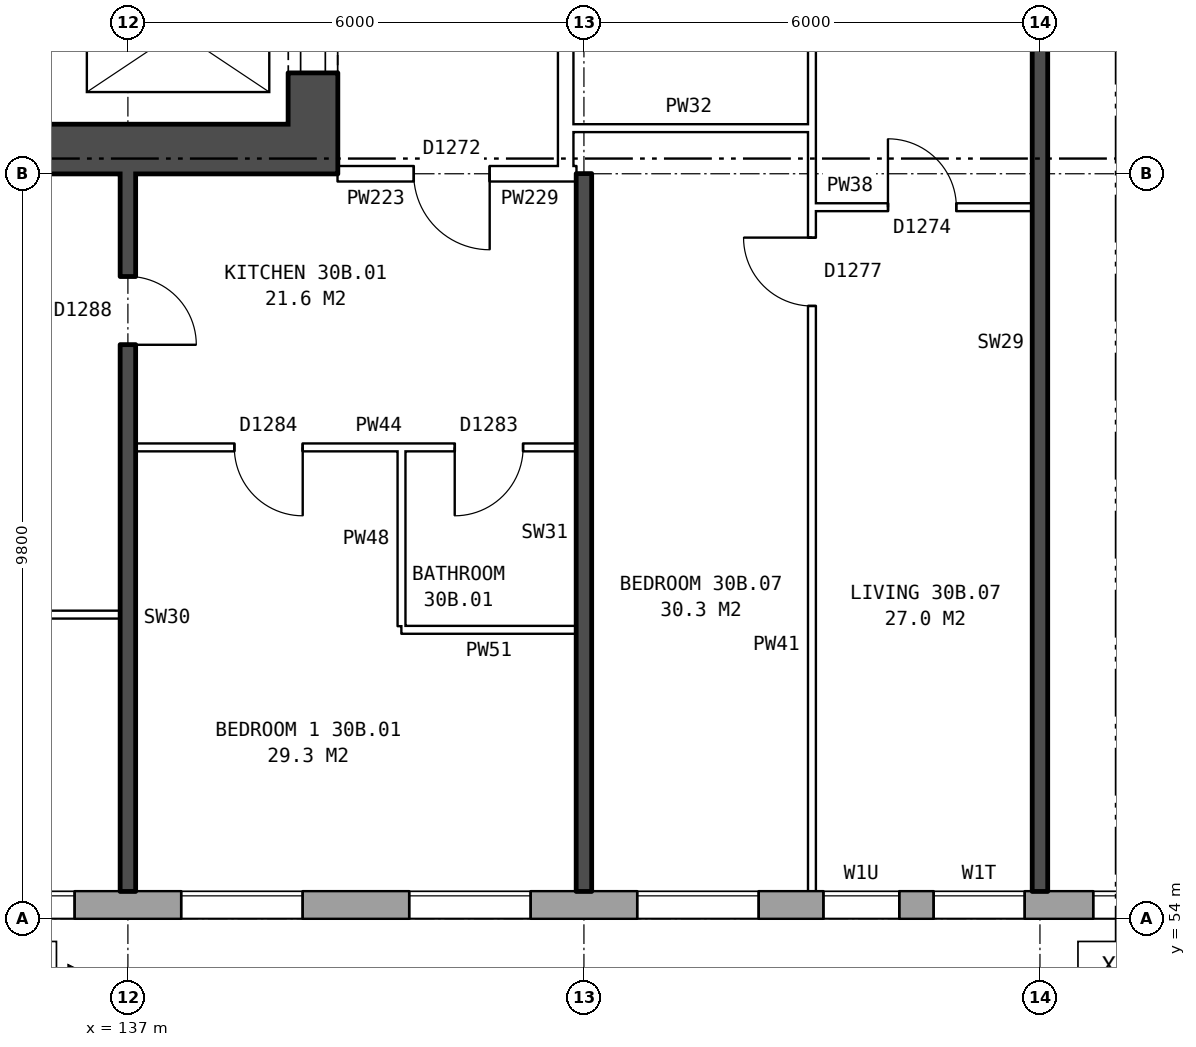
"""IFC4 building model, lengths in metres.
Left out: names, types, materials, properties, quantities, classifications, styles, units other than length and angle.
Written with IfcOpenShell. Run it as: python <this file> out.ifc"""

import sys

from ifc_helpers import new_model, si_unit, direction, frame, frame_2d, origin, place, context, subcontext, project, spatial, rectangle, extrude, element, fill, save


model = new_model("IFC4")
c1 = context("Model", 3, precision=1e-05, world=origin(), true_north=direction((0.0, 1.0)))
c2 = subcontext(c1, "Body", "Model", "MODEL_VIEW")
j1 = project(units=[si_unit("LENGTHUNIT", "METRE"), si_unit("PLANEANGLEUNIT", "RADIAN")], contexts=[c1])
p1 = place(None, origin())
s1 = spatial("IfcSite", under=j1, at=p1, CompositionType="ELEMENT")
p2 = place(p1, origin())
s2 = spatial("IfcBuilding", under=s1, at=p2, CompositionType="ELEMENT")
p3 = place(p2, frame((0.0, 0.0, 108.8)))
s3 = spatial("IfcBuildingStorey", under=s2, at=p3, CompositionType="ELEMENT", Elevation=108.8)
p4 = place(p3, frame((134.075, 54.18, 0.0), z_axis=(0.0, 0.0, 1.0), x_axis=(1.0, 0.0, 0.0)))
e1 = element("IfcWall", 1, at=p4, inside=s3, PredefinedType="STANDARD", context=c2, shape_type="SweptSolid", body=[
    extrude(rectangle(XDim=36.851, YDim=0.36, at=frame_2d((18.425, 0.0))), origin(), (0.0, 0.0, 1.0), 2.85),
])
p5 = place(p4, frame((0.625, 0.0, 0.8)))
e2 = element("IfcOpeningElement", 2, at=p5, cuts=e1, PredefinedType="OPENING", context=c2, shape_type="SweptSolid", body=[
    extrude(rectangle(XDim=1.6, YDim=1.8, at=frame_2d((0.8, 0.9))), frame((0.0, 0.19, 0.0), z_axis=(0.0, -1.0, 0.0), x_axis=(1.0, 0.0, 0.0)), (0.0, 0.0, 1.0), 0.38),
])
p6 = place(p4, frame((3.625, 0.0, 0.8)))
e3 = element("IfcOpeningElement", 3, at=p6, cuts=e1, PredefinedType="OPENING", context=c2, shape_type="SweptSolid", body=[
    extrude(rectangle(XDim=1.6, YDim=1.8, at=frame_2d((0.8, 0.9))), frame((0.0, 0.19, 0.0), z_axis=(0.0, -1.0, 0.0), x_axis=(1.0, 0.0, 0.0)), (0.0, 0.0, 1.0), 0.38),
])
p7 = place(p4, frame((6.625, 0.0, 0.8)))
e4 = element("IfcOpeningElement", 4, at=p7, cuts=e1, PredefinedType="OPENING", context=c2, shape_type="SweptSolid", body=[
    extrude(rectangle(XDim=1.6, YDim=1.8, at=frame_2d((0.8, 0.9))), frame((0.0, 0.19, 0.0), z_axis=(0.0, -1.0, 0.0), x_axis=(1.0, 0.0, 0.0)), (0.0, 0.0, 1.0), 0.38),
])
p8 = place(p4, frame((9.625, 0.0, 0.8)))
e5 = element("IfcOpeningElement", 5, at=p8, cuts=e1, PredefinedType="OPENING", context=c2, shape_type="SweptSolid", body=[
    extrude(rectangle(XDim=1.6, YDim=1.8, at=frame_2d((0.8, 0.9))), frame((0.0, 0.19, 0.0), z_axis=(0.0, -1.0, 0.0), x_axis=(1.0, 0.0, 0.0)), (0.0, 0.0, 1.0), 0.38),
])
p9 = place(p4, frame((12.075, 0.0, 1.65)))
e6 = element("IfcOpeningElement", 6, at=p9, cuts=e1, PredefinedType="OPENING", context=c2, shape_type="SweptSolid", body=[
    extrude(rectangle(XDim=1.0, YDim=0.9, at=frame_2d((0.5, 0.45))), frame((0.0, 0.19, 0.0), z_axis=(0.0, -1.0, 0.0), x_axis=(1.0, 0.0, 0.0)), (0.0, 0.0, 1.0), 0.38),
])
p10 = place(p4, frame((15.625, 0.0, 0.8)))
e7 = element("IfcOpeningElement", 7, at=p10, cuts=e1, PredefinedType="OPENING", context=c2, shape_type="SweptSolid", body=[
    extrude(rectangle(XDim=1.6, YDim=1.8, at=frame_2d((0.8, 0.9))), frame((0.0, 0.19, 0.0), z_axis=(0.0, -1.0, 0.0), x_axis=(1.0, 0.0, 0.0)), (0.0, 0.0, 1.0), 0.38),
])
p11 = place(p4, frame((18.625, 0.0, 0.8)))
e8 = element("IfcOpeningElement", 8, at=p11, cuts=e1, PredefinedType="OPENING", context=c2, shape_type="SweptSolid", body=[
    extrude(rectangle(XDim=1.6, YDim=1.8, at=frame_2d((0.8, 0.9))), frame((0.0, 0.19, 0.0), z_axis=(0.0, -1.0, 0.0), x_axis=(1.0, 0.0, 0.0)), (0.0, 0.0, 1.0), 0.38),
])
p12 = place(p4, frame((21.125, 0.0, 0.8)))
e9 = element("IfcOpeningElement", 9, at=p12, cuts=e1, PredefinedType="OPENING", context=c2, shape_type="SweptSolid", body=[
    extrude(rectangle(XDim=1.4, YDim=0.9, at=frame_2d((0.7, 0.45))), frame((0.0, 0.19, 0.0), z_axis=(0.0, -1.0, 0.0), x_axis=(1.0, 0.0, 0.0)), (0.0, 0.0, 1.0), 0.38),
])
p13 = place(p4, frame((24.625, 0.0, 0.8)))
e10 = element("IfcOpeningElement", 10, at=p13, cuts=e1, PredefinedType="OPENING", context=c2, shape_type="SweptSolid", body=[
    extrude(rectangle(XDim=1.6, YDim=1.8, at=frame_2d((0.8, 0.9))), frame((0.0, 0.19, 0.0), z_axis=(0.0, -1.0, 0.0), x_axis=(1.0, 0.0, 0.0)), (0.0, 0.0, 1.0), 0.38),
])
p14 = place(p4, frame((27.625, 0.0, 0.8)))
e11 = element("IfcOpeningElement", 11, at=p14, cuts=e1, PredefinedType="OPENING", context=c2, shape_type="SweptSolid", body=[
    extrude(rectangle(XDim=1.6, YDim=1.8, at=frame_2d((0.8, 0.9))), frame((0.0, 0.19, 0.0), z_axis=(0.0, -1.0, 0.0), x_axis=(1.0, 0.0, 0.0)), (0.0, 0.0, 1.0), 0.38),
])
p15 = place(p4, frame((30.625, 0.0, 0.8)))
e12 = element("IfcOpeningElement", 12, at=p15, cuts=e1, PredefinedType="OPENING", context=c2, shape_type="SweptSolid", body=[
    extrude(rectangle(XDim=1.6, YDim=1.8, at=frame_2d((0.8, 0.9))), frame((0.0, 0.19, 0.0), z_axis=(0.0, -1.0, 0.0), x_axis=(1.0, 0.0, 0.0)), (0.0, 0.0, 1.0), 0.38),
])
p16 = place(p4, frame((33.625, 0.0, 0.8)))
e13 = element("IfcOpeningElement", 13, at=p16, cuts=e1, PredefinedType="OPENING", context=c2, shape_type="SweptSolid", body=[
    extrude(rectangle(XDim=1.6, YDim=1.8, at=frame_2d((0.8, 0.9))), frame((0.0, 0.19, 0.0), z_axis=(0.0, -1.0, 0.0), x_axis=(1.0, 0.0, 0.0)), (0.0, 0.0, 1.0), 0.38),
])
p17 = place(p4, frame((13.525, 0.0, 0.15)))
e14 = element("IfcOpeningElement", 14, at=p17, cuts=e1, PredefinedType="OPENING", context=c2, shape_type="SweptSolid", body=[
    extrude(rectangle(XDim=1.2, YDim=0.9, at=frame_2d((0.6, 0.45))), frame((0.0, 0.19, 0.0), z_axis=(0.0, -1.0, 0.0), x_axis=(1.0, 0.0, 0.0)), (0.0, 0.0, 1.0), 0.38),
])
p18 = place(p4, frame((23.725, 0.0, 1.7)))
e15 = element("IfcOpeningElement", 15, at=p18, cuts=e1, PredefinedType="OPENING", context=c2, shape_type="SweptSolid", body=[
    extrude(rectangle(XDim=0.6, YDim=0.9, at=frame_2d((0.3, 0.45))), frame((0.0, 0.19, 0.0), z_axis=(0.0, -1.0, 0.0), x_axis=(1.0, 0.0, 0.0)), (0.0, 0.0, 1.0), 0.38),
])
p19 = place(p3, frame((139.435, 64.45, 0.0), z_axis=(0.0, 0.0, 1.0), x_axis=(0.0, 1.0, 0.0)))
e16 = element("IfcWall", 16, at=p19, inside=s3, PredefinedType="SHEAR", context=c2, shape_type="SweptSolid", body=[
    extrude(rectangle(XDim=11.1, YDim=0.65, at=frame_2d((5.55, 0.0))), origin(), (0.0, 0.0, 1.0), 2.85),
])
p20 = place(p19, frame((0.675, 0.0, 0.0)))
e17 = element("IfcOpeningElement", 17, at=p20, cuts=e16, PredefinedType="OPENING", context=c2, shape_type="SweptSolid", body=[
    extrude(rectangle(XDim=1.1, YDim=2.1, at=frame_2d((0.55, 1.05))), frame((0.0, 0.335, 0.0), z_axis=(0.0, -1.0, 0.0), x_axis=(1.0, 0.0, 0.0)), (0.0, 0.0, 1.0), 0.67),
])
p21 = place(p19, frame((9.25, 0.0, 0.0)))
e18 = element("IfcOpeningElement", 18, at=p21, cuts=e16, PredefinedType="OPENING", context=c2, shape_type="SweptSolid", body=[
    extrude(rectangle(XDim=1.1, YDim=2.1, at=frame_2d((0.55, 1.05))), frame((0.0, 0.335, 0.0), z_axis=(0.0, -1.0, 0.0), x_axis=(1.0, 0.0, 0.0)), (0.0, 0.0, 1.0), 0.67),
])
p22 = place(p19, frame((7.475, 0.0, 0.0)))
e19 = element("IfcOpeningElement", 19, at=p22, cuts=e16, PredefinedType="OPENING", context=c2, shape_type="SweptSolid", body=[
    extrude(rectangle(XDim=0.85, YDim=2.1, at=frame_2d((0.425, 1.05))), frame((0.0, 0.335, 0.0), z_axis=(0.0, -1.0, 0.0), x_axis=(1.0, 0.0, 0.0)), (0.0, 0.0, 1.0), 0.67),
])
p23 = place(p3, frame((139.76, 64.125, 0.0), z_axis=(0.0, 0.0, 1.0), x_axis=(-1.0, 0.0, 0.0)))
e20 = element("IfcWall", 20, at=p23, inside=s3, PredefinedType="SHEAR", context=c2, shape_type="SweptSolid", body=[
    extrude(rectangle(XDim=8.4, YDim=0.65, at=frame_2d((4.2, 0.0))), origin(), (0.0, 0.0, 1.0), 2.85),
])
p24 = place(p3, frame((142.76, 63.9, 0.0), z_axis=(0.0, 0.0, 1.0), x_axis=(0.0, 1.0, 0.0)))
e21 = element("IfcWall", 21, at=p24, inside=s3, PredefinedType="PARTITIONING", context=c2, shape_type="SweptSolid", body=[
    extrude(rectangle(XDim=12.2, YDim=0.2, at=frame_2d((6.1, 0.0))), origin(), (0.0, 0.0, 1.0), 2.85),
])
p25 = place(p24, frame((5.1, 0.0, 0.0)))
e22 = element("IfcOpeningElement", 22, at=p25, cuts=e21, PredefinedType="OPENING", context=c2, shape_type="SweptSolid", body=[
    extrude(rectangle(XDim=2.0, YDim=2.1, at=frame_2d((1.0, 1.05))), frame((0.0, 0.11, 0.0), z_axis=(0.0, -1.0, 0.0), x_axis=(1.0, 0.0, 0.0)), (0.0, 0.0, 1.0), 0.22),
])
p26 = place(p3, frame((140.6, 57.8, 0.0), z_axis=(0.0, 0.0, 1.0), x_axis=(1.0, 0.0, 0.0)))
e23 = element("IfcWall", 23, at=p26, inside=s3, PredefinedType="PARTITIONING", context=c2, shape_type="SweptSolid", body=[
    extrude(rectangle(XDim=2.3, YDim=0.1, at=frame_2d((1.15, 0.0))), origin(), (0.0, 0.0, 1.0), 2.85),
])
p27 = place(p3, frame((131.36, 58.0, 0.0), z_axis=(0.0, 0.0, 1.0), x_axis=(1.0, 0.0, 0.0)))
e24 = element("IfcWall", 24, at=p27, inside=s3, PredefinedType="PARTITIONING", context=c2, shape_type="SweptSolid", body=[
    extrude(rectangle(XDim=5.54, YDim=0.1, at=frame_2d((2.77, 0.0))), origin(), (0.0, 0.0, 1.0), 2.85),
])
p28 = place(p27, frame((2.32, 0.0, 0.0)))
e25 = element("IfcOpeningElement", 25, at=p28, cuts=e24, PredefinedType="OPENING", context=c2, shape_type="SweptSolid", body=[
    extrude(rectangle(XDim=0.9, YDim=2.1, at=frame_2d((0.45, 1.05))), frame((0.0, 0.06, 0.0), z_axis=(0.0, -1.0, 0.0), x_axis=(1.0, 0.0, 0.0)), (0.0, 0.0, 1.0), 0.12),
])
p29 = place(p3, frame((137.1, 60.2, 0.0), z_axis=(0.0, 0.0, 1.0), x_axis=(1.0, 0.0, 0.0)))
e26 = element("IfcWall", 26, at=p29, inside=s3, PredefinedType="PARTITIONING", context=c2, shape_type="SweptSolid", body=[
    extrude(rectangle(XDim=5.8, YDim=0.1, at=frame_2d((2.9, 0.0))), origin(), (0.0, 0.0, 1.0), 2.85),
])
p30 = place(p29, frame((1.3, 0.0, 0.0)))
e27 = element("IfcOpeningElement", 27, at=p30, cuts=e26, PredefinedType="OPENING", context=c2, shape_type="SweptSolid", body=[
    extrude(rectangle(XDim=0.9, YDim=2.1, at=frame_2d((0.45, 1.05))), frame((0.0, 0.06, 0.0), z_axis=(0.0, -1.0, 0.0), x_axis=(1.0, 0.0, 0.0)), (0.0, 0.0, 1.0), 0.12),
])
p31 = place(p29, frame((4.2, 0.0, 0.0)))
e28 = element("IfcOpeningElement", 28, at=p31, cuts=e26, PredefinedType="OPENING", context=c2, shape_type="SweptSolid", body=[
    extrude(rectangle(XDim=0.9, YDim=2.1, at=frame_2d((0.45, 1.05))), frame((0.0, 0.06, 0.0), z_axis=(0.0, -1.0, 0.0), x_axis=(1.0, 0.0, 0.0)), (0.0, 0.0, 1.0), 0.12),
])
p32 = place(p3, frame((146.0, 63.36, 0.0), z_axis=(0.0, 0.0, 1.0), x_axis=(1.0, 0.0, 0.0)))
e29 = element("IfcWall", 29, at=p32, inside=s3, PredefinedType="PARTITIONING", context=c2, shape_type="SweptSolid", body=[
    extrude(rectangle(XDim=2.9, YDim=0.1, at=frame_2d((1.45, 0.0))), origin(), (0.0, 0.0, 1.0), 2.85),
])
p33 = place(p32, frame((1.0, 0.0, 0.0)))
e30 = element("IfcOpeningElement", 30, at=p33, cuts=e29, PredefinedType="OPENING", context=c2, shape_type="SweptSolid", body=[
    extrude(rectangle(XDim=0.9, YDim=2.1, at=frame_2d((0.45, 1.05))), frame((0.0, 0.06, 0.0), z_axis=(0.0, -1.0, 0.0), x_axis=(1.0, 0.0, 0.0)), (0.0, 0.0, 1.0), 0.12),
])
p34 = place(p3, frame((139.76, 63.8, 0.0), z_axis=(0.0, 0.0, 1.0), x_axis=(1.0, 0.0, 0.0)))
e31 = element("IfcWall", 31, at=p34, inside=s3, PredefinedType="PARTITIONING", context=c2, shape_type="SweptSolid", body=[
    extrude(rectangle(XDim=3.0, YDim=0.2, at=frame_2d((1.5, 0.0))), origin(), (0.0, 0.0, 1.0), 2.85),
])
p35 = place(p34, frame((1.0, 0.0, 0.0)))
e32 = element("IfcOpeningElement", 32, at=p35, cuts=e31, PredefinedType="OPENING", context=c2, shape_type="SweptSolid", body=[
    extrude(rectangle(XDim=1.0, YDim=2.1, at=frame_2d((0.5, 1.05))), frame((0.0, 0.11, 0.0), z_axis=(0.0, -1.0, 0.0), x_axis=(1.0, 0.0, 0.0)), (0.0, 0.0, 1.0), 0.22),
])
p36 = place(p3, frame((142.76, 63.8, 0.0), z_axis=(0.0, 0.0, 1.0), x_axis=(1.0, 0.0, 0.0)))
e33 = element("IfcWall", 33, at=p36, inside=s3, PredefinedType="PARTITIONING", context=c2, shape_type="SweptSolid", body=[
    extrude(rectangle(XDim=0.14, YDim=0.2, at=frame_2d((0.07, 0.0))), origin(), (0.0, 0.0, 1.0), 2.85),
])
p37 = place(p3, frame((142.76, 64.4, 0.0), z_axis=(0.0, 0.0, 1.0), x_axis=(1.0, 0.0, 0.0)))
e34 = element("IfcWall", 34, at=p37, inside=s3, PredefinedType="PARTITIONING", context=c2, shape_type="SweptSolid", body=[
    extrude(rectangle(XDim=3.24, YDim=0.1, at=frame_2d((1.62, 0.0))), origin(), (0.0, 0.0, 1.0), 2.85),
])
p38 = place(p3, frame((137.0, 54.36, 0.0), z_axis=(0.0, 0.0, 1.0), x_axis=(0.0, 1.0, 0.0)))
e35 = element("IfcWall", 35, at=p38, inside=s3, PredefinedType="SOLIDWALL", context=c2, shape_type="SweptSolid", body=[
    extrude(rectangle(XDim=9.44, YDim=0.2, at=frame_2d((4.72, 0.0))), origin(), (0.0, 0.0, 1.0), 2.85),
])
p39 = place(p38, frame((7.19, 0.0, 0.0)))
e36 = element("IfcOpeningElement", 36, at=p39, cuts=e35, PredefinedType="OPENING", context=c2, shape_type="SweptSolid", body=[
    extrude(rectangle(XDim=0.9, YDim=2.1, at=frame_2d((0.45, 1.05))), frame((0.0, 0.11, 0.0), z_axis=(0.0, -1.0, 0.0), x_axis=(1.0, 0.0, 0.0)), (0.0, 0.0, 1.0), 0.22),
])
p40 = place(p3, frame((140.6, 57.85, 0.0), z_axis=(0.0, 0.0, 1.0), x_axis=(0.0, 1.0, 0.0)))
e37 = element("IfcWall", 37, at=p40, inside=s3, PredefinedType="PARTITIONING", context=c2, shape_type="SweptSolid", body=[
    extrude(rectangle(XDim=2.3, YDim=0.1, at=frame_2d((1.15, 0.0))), origin(), (0.0, 0.0, 1.0), 2.85),
])
p41 = place(p3, frame((143.0, 54.36, 0.0), z_axis=(0.0, 0.0, 1.0), x_axis=(0.0, 1.0, 0.0)))
e38 = element("IfcWall", 38, at=p41, inside=s3, PredefinedType="SOLIDWALL", context=c2, shape_type="SweptSolid", body=[
    extrude(rectangle(XDim=9.44, YDim=0.2, at=frame_2d((4.72, 0.0))), origin(), (0.0, 0.0, 1.0), 2.85),
])
p42 = place(p3, frame((146.0, 54.36, 0.0), z_axis=(0.0, 0.0, 1.0), x_axis=(0.0, 1.0, 0.0)))
e39 = element("IfcWall", 39, at=p42, inside=s3, PredefinedType="PARTITIONING", context=c2, shape_type="SweptSolid", body=[
    extrude(rectangle(XDim=14.34, YDim=0.1, at=frame_2d((7.17, 0.0))), origin(), (0.0, 0.0, 1.0), 2.85),
])
p43 = place(p42, frame((7.7, 0.0, 0.0)))
e40 = element("IfcOpeningElement", 40, at=p43, cuts=e39, PredefinedType="OPENING", context=c2, shape_type="SweptSolid", body=[
    extrude(rectangle(XDim=0.9, YDim=2.1, at=frame_2d((0.45, 1.05))), frame((0.0, 0.06, 0.0), z_axis=(0.0, -1.0, 0.0), x_axis=(1.0, 0.0, 0.0)), (0.0, 0.0, 1.0), 0.12),
])
p44 = place(p42, frame((13.04, 0.0, 0.0)))
e41 = element("IfcOpeningElement", 41, at=p44, cuts=e39, PredefinedType="OPENING", context=c2, shape_type="SweptSolid", body=[
    extrude(rectangle(XDim=0.9, YDim=2.1, at=frame_2d((0.45, 1.05))), frame((0.0, 0.06, 0.0), z_axis=(0.0, -1.0, 0.0), x_axis=(1.0, 0.0, 0.0)), (0.0, 0.0, 1.0), 0.12),
])
p45 = place(p3, frame((149.0, 54.36, 0.0), z_axis=(0.0, 0.0, 1.0), x_axis=(0.0, 1.0, 0.0)))
e42 = element("IfcWall", 42, at=p45, inside=s3, PredefinedType="SOLIDWALL", context=c2, shape_type="SweptSolid", body=[
    extrude(rectangle(XDim=14.44, YDim=0.2, at=frame_2d((7.22, 0.0))), origin(), (0.0, 0.0, 1.0), 2.85),
])
p46 = place(p5, origin())
e43 = element("IfcWindow", 43, at=p46, inside=s3, PartitioningType="SINGLE_PANEL", PredefinedType="WINDOW", context=c2, shape_type="SweptSolid", body=[
    extrude(rectangle(XDim=1.6, YDim=1.8, at=frame_2d((0.8, 0.9))), frame((0.0, 0.15, 0.0), z_axis=(0.0, -1.0, 0.0), x_axis=(1.0, 0.0, 0.0)), (0.0, 0.0, 1.0), 0.06),
])
fill(e2, e43)
p47 = place(p6, origin())
e44 = element("IfcWindow", 44, at=p47, inside=s3, PartitioningType="SINGLE_PANEL", PredefinedType="WINDOW", context=c2, shape_type="SweptSolid", body=[
    extrude(rectangle(XDim=1.6, YDim=1.8, at=frame_2d((0.8, 0.9))), frame((0.0, 0.15, 0.0), z_axis=(0.0, -1.0, 0.0), x_axis=(1.0, 0.0, 0.0)), (0.0, 0.0, 1.0), 0.06),
])
fill(e3, e44)
p48 = place(p7, origin())
e45 = element("IfcWindow", 45, at=p48, inside=s3, PartitioningType="SINGLE_PANEL", PredefinedType="WINDOW", context=c2, shape_type="SweptSolid", body=[
    extrude(rectangle(XDim=1.6, YDim=1.8, at=frame_2d((0.8, 0.9))), frame((0.0, 0.15, 0.0), z_axis=(0.0, -1.0, 0.0), x_axis=(1.0, 0.0, 0.0)), (0.0, 0.0, 1.0), 0.06),
])
fill(e4, e45)
p49 = place(p8, origin())
e46 = element("IfcWindow", 46, at=p49, inside=s3, PartitioningType="SINGLE_PANEL", PredefinedType="WINDOW", context=c2, shape_type="SweptSolid", body=[
    extrude(rectangle(XDim=1.6, YDim=1.8, at=frame_2d((0.8, 0.9))), frame((0.0, 0.15, 0.0), z_axis=(0.0, -1.0, 0.0), x_axis=(1.0, 0.0, 0.0)), (0.0, 0.0, 1.0), 0.06),
])
fill(e5, e46)
p50 = place(p9, origin())
e47 = element("IfcWindow", 47, at=p50, inside=s3, PartitioningType="SINGLE_PANEL", PredefinedType="WINDOW", context=c2, shape_type="SweptSolid", body=[
    extrude(rectangle(XDim=1.0, YDim=0.9, at=frame_2d((0.5, 0.45))), frame((0.0, 0.15, 0.0), z_axis=(0.0, -1.0, 0.0), x_axis=(1.0, 0.0, 0.0)), (0.0, 0.0, 1.0), 0.06),
])
fill(e6, e47)
p51 = place(p10, origin())
e48 = element("IfcWindow", 48, at=p51, inside=s3, PartitioningType="SINGLE_PANEL", PredefinedType="WINDOW", context=c2, shape_type="SweptSolid", body=[
    extrude(rectangle(XDim=1.6, YDim=1.8, at=frame_2d((0.8, 0.9))), frame((0.0, 0.15, 0.0), z_axis=(0.0, -1.0, 0.0), x_axis=(1.0, 0.0, 0.0)), (0.0, 0.0, 1.0), 0.06),
])
fill(e7, e48)
p52 = place(p20, origin())
e49 = element("IfcDoor", 49, at=p52, inside=s3, OperationType="DOUBLE_DOOR_SLIDING", PredefinedType="DOOR", context=c2, shape_type="SweptSolid", body=[
    extrude(rectangle(XDim=1.1, YDim=2.1, at=frame_2d((0.55, 1.05))), frame((0.0, 0.31, 0.0), z_axis=(0.0, -1.0, 0.0), x_axis=(1.0, 0.0, 0.0)), (0.0, 0.0, 1.0), 0.05),
])
fill(e17, e49)
p53 = place(p30, frame((0.9, 0.0, 0.0), z_axis=(0.0, 0.0, 1.0), x_axis=(-1.0, 0.0, 0.0)))
e50 = element("IfcDoor", 50, at=p53, inside=s3, OperationType="SINGLE_SWING_LEFT", PredefinedType="DOOR", context=c2, shape_type="SweptSolid", body=[
    extrude(rectangle(XDim=0.9, YDim=2.1, at=frame_2d((0.45, 1.05))), frame((0.0, 0.025, 0.0), z_axis=(0.0, -1.0, 0.0), x_axis=(1.0, 0.0, 0.0)), (0.0, 0.0, 1.0), 0.05),
])
fill(e27, e50)
p54 = place(p35, frame((1.0, 0.0, 0.0), z_axis=(0.0, 0.0, 1.0), x_axis=(-1.0, 0.0, 0.0)))
e51 = element("IfcDoor", 51, at=p54, inside=s3, OperationType="SINGLE_SWING_LEFT", PredefinedType="DOOR", context=c2, shape_type="SweptSolid", body=[
    extrude(rectangle(XDim=1.0, YDim=2.1, at=frame_2d((0.5, 1.05))), frame((0.0, 0.025, 0.0), z_axis=(0.0, -1.0, 0.0), x_axis=(1.0, 0.0, 0.0)), (0.0, 0.0, 1.0), 0.05),
])
fill(e32, e51)
p55 = place(p39, frame((0.9, 0.0, 0.0), z_axis=(0.0, 0.0, 1.0), x_axis=(-1.0, 0.0, 0.0)))
e52 = element("IfcDoor", 52, at=p55, inside=s3, OperationType="SINGLE_SWING_RIGHT", PredefinedType="DOOR", context=c2, shape_type="SweptSolid", body=[
    extrude(rectangle(XDim=0.9, YDim=2.1, at=frame_2d((0.45, 1.05))), frame((0.0, 0.025, 0.0), z_axis=(0.0, -1.0, 0.0), x_axis=(1.0, 0.0, 0.0)), (0.0, 0.0, 1.0), 0.05),
])
fill(e36, e52)
p56 = place(p31, frame((0.9, 0.0, 0.0), z_axis=(0.0, 0.0, 1.0), x_axis=(-1.0, 0.0, 0.0)))
e53 = element("IfcDoor", 53, at=p56, inside=s3, OperationType="SINGLE_SWING_RIGHT", PredefinedType="DOOR", context=c2, shape_type="SweptSolid", body=[
    extrude(rectangle(XDim=0.9, YDim=2.1, at=frame_2d((0.45, 1.05))), frame((0.0, 0.025, 0.0), z_axis=(0.0, -1.0, 0.0), x_axis=(1.0, 0.0, 0.0)), (0.0, 0.0, 1.0), 0.05),
])
fill(e28, e53)
p57 = place(p43, origin())
e54 = element("IfcDoor", 54, at=p57, inside=s3, OperationType="SINGLE_SWING_RIGHT", PredefinedType="DOOR", context=c2, shape_type="SweptSolid", body=[
    extrude(rectangle(XDim=0.9, YDim=2.1, at=frame_2d((0.45, 1.05))), frame((0.0, 0.025, 0.0), z_axis=(0.0, -1.0, 0.0), x_axis=(1.0, 0.0, 0.0)), (0.0, 0.0, 1.0), 0.05),
])
fill(e40, e54)
p58 = place(p33, origin())
e55 = element("IfcDoor", 55, at=p58, inside=s3, OperationType="SINGLE_SWING_LEFT", PredefinedType="DOOR", context=c2, shape_type="SweptSolid", body=[
    extrude(rectangle(XDim=0.9, YDim=2.1, at=frame_2d((0.45, 1.05))), frame((0.0, 0.025, 0.0), z_axis=(0.0, -1.0, 0.0), x_axis=(1.0, 0.0, 0.0)), (0.0, 0.0, 1.0), 0.05),
])
fill(e30, e55)
p59 = place(p17, origin())
e56 = element("IfcWindow", 56, at=p59, inside=s3, PartitioningType="SINGLE_PANEL", PredefinedType="WINDOW", context=c2, shape_type="SweptSolid", body=[
    extrude(rectangle(XDim=1.2, YDim=0.9, at=frame_2d((0.6, 0.45))), frame((0.0, 0.15, 0.0), z_axis=(0.0, -1.0, 0.0), x_axis=(1.0, 0.0, 0.0)), (0.0, 0.0, 1.0), 0.06),
])
fill(e14, e56)
save(model, sys.argv[1])
